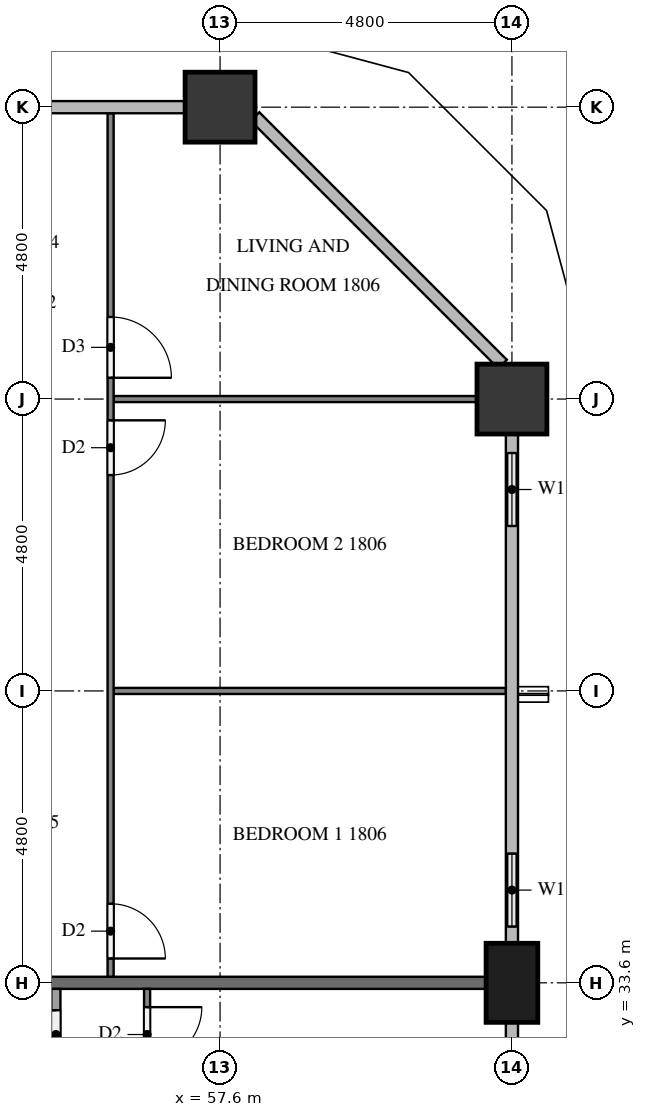
"""IFC4 building model, lengths in metres.
Left out: names, types, materials, properties, quantities, classifications, styles, units other than length and angle.
Written with IfcOpenShell. Run it as: python <this file> out.ifc"""

import sys

from ifc_helpers import new_model, si_unit, direction, frame, frame_2d, origin, origin_2d, place, context, subcontext, project, spatial, rectangle, extrude, element, fill, save


model = new_model("IFC4")
c1 = context("Model", 3, precision=1e-05, world=origin(), true_north=direction((0.0, 1.0)))
c2 = subcontext(c1, "Body", "Model", "MODEL_VIEW")
j1 = project(units=[si_unit("LENGTHUNIT", "METRE"), si_unit("PLANEANGLEUNIT", "RADIAN")], contexts=[c1])
p1 = place(None, origin())
s1 = spatial("IfcSite", under=j1, at=p1, CompositionType="ELEMENT")
p2 = place(p1, origin())
s2 = spatial("IfcBuilding", under=s1, at=p2, CompositionType="ELEMENT")
p3 = place(p2, frame((0.0, 0.0, 73.3)))
s3 = spatial("IfcBuildingStorey", under=s2, at=p3, CompositionType="ELEMENT", Elevation=73.3)
p4 = place(p3, frame((62.4, 33.6, 0.0), z_axis=(0.0, 0.0, 1.0), x_axis=(0.0, 1.0, 0.0)))
e1 = element("IfcColumn", 1, at=p4, inside=s3, PredefinedType="COLUMN", context=c2, shape_type="SweptSolid", body=[
    extrude(rectangle(XDim=1.3, YDim=0.85, at=origin_2d()), origin(), (0.0, 0.0, 1.0), 3.2),
])
for number, where, z_axis, x_axis in (
    (2, (62.4, 43.2, 0.0), (0.0, 0.0, 1.0), (1.0, 0.0, 0.0)),
    (3, (57.6, 48.0, 0.0), (0.0, 0.0, 1.0), (1.0, 0.0, 0.0)),
):
    element("IfcColumn", number, at=place(p3, frame(where, z_axis=z_axis, x_axis=x_axis)), inside=s3, PredefinedType="COLUMN", context=c2, shape_type="SweptSolid", body=[
        extrude(rectangle(XDim=1.15, YDim=1.15, at=origin_2d()), origin(), (0.0, 0.0, 1.0), 3.2),
    ])
p5 = place(p3, frame((62.4, 31.2, 0.0), z_axis=(0.0, 0.0, 1.0), x_axis=(0.0, 1.0, 0.0)))
e4 = element("IfcWall", 4, at=p5, inside=s3, PredefinedType="SOLIDWALL", context=c2, shape_type="SweptSolid", body=[
    extrude(rectangle(XDim=1.75, YDim=0.15, at=frame_2d((0.875, 0.0))), origin(), (0.0, 0.0, 1.0), 3.2),
])
p6 = place(p5, frame((0.275, 0.0, 0.9)))
e5 = element("IfcOpeningElement", 5, at=p6, cuts=e4, PredefinedType="OPENING", context=c2, shape_type="SweptSolid", body=[
    extrude(rectangle(XDim=1.2, YDim=1.4, at=frame_2d((0.6, 0.7))), frame((0.0, 0.085, 0.0), z_axis=(0.0, -1.0, 0.0), x_axis=(1.0, 0.0, 0.0)), (0.0, 0.0, 1.0), 0.17),
])
p7 = place(p3, frame((62.4, 34.25, 0.0), z_axis=(0.0, 0.0, 1.0), x_axis=(0.0, 1.0, 0.0)))
e6 = element("IfcWall", 6, at=p7, inside=s3, PredefinedType="SOLIDWALL", context=c2, shape_type="SweptSolid", body=[
    extrude(rectangle(XDim=1.75, YDim=0.15, at=frame_2d((0.875, 0.0))), origin(), (0.0, 0.0, 1.0), 3.2),
])
p8 = place(p7, frame((0.275, 0.0, 0.9)))
e7 = element("IfcOpeningElement", 7, at=p8, cuts=e6, PredefinedType="OPENING", context=c2, shape_type="SweptSolid", body=[
    extrude(rectangle(XDim=1.2, YDim=1.4, at=frame_2d((0.6, 0.7))), frame((0.0, 0.085, 0.0), z_axis=(0.0, -1.0, 0.0), x_axis=(1.0, 0.0, 0.0)), (0.0, 0.0, 1.0), 0.17),
])
p9 = place(p3, frame((62.4, 40.8, 0.0), z_axis=(0.0, 0.0, 1.0), x_axis=(0.0, 1.0, 0.0)))
e8 = element("IfcWall", 8, at=p9, inside=s3, PredefinedType="SOLIDWALL", context=c2, shape_type="SweptSolid", body=[
    extrude(rectangle(XDim=1.825, YDim=0.15, at=frame_2d((0.913, 0.0))), origin(), (0.0, 0.0, 1.0), 3.2),
])
p10 = place(p9, frame((0.312, 0.0, 0.9)))
e9 = element("IfcOpeningElement", 9, at=p10, cuts=e8, PredefinedType="OPENING", context=c2, shape_type="SweptSolid", body=[
    extrude(rectangle(XDim=1.2, YDim=1.4, at=frame_2d((0.6, 0.7))), frame((0.0, 0.085, 0.0), z_axis=(0.0, -1.0, 0.0), x_axis=(1.0, 0.0, 0.0)), (0.0, 0.0, 1.0), 0.17),
])
p11 = place(p3, frame((50.5, 33.6, 0.0), z_axis=(0.0, 0.0, 1.0), x_axis=(1.0, 0.0, 0.0)))
e10 = element("IfcWall", 10, at=p11, inside=s3, PredefinedType="PARTITIONING", context=c2, shape_type="SweptSolid", body=[
    extrude(rectangle(XDim=11.475, YDim=0.2, at=frame_2d((5.738, 0.0))), origin(), (0.0, 0.0, 1.0), 3.2),
])
p12 = place(p3, frame((56.4, 33.5, 0.0), z_axis=(0.0, 0.0, 1.0), x_axis=(0.0, -1.0, 0.0)))
e11 = element("IfcWall", 11, at=p12, inside=s3, PredefinedType="PARTITIONING", context=c2, shape_type="SweptSolid", body=[
    extrude(rectangle(XDim=14.2, YDim=0.1, at=frame_2d((7.1, 0.0))), origin(), (0.0, 0.0, 1.0), 3.2),
])
p13 = place(p12, frame((9.85, 0.0, 0.0)))
e12 = element("IfcOpeningElement", 12, at=p13, cuts=e11, PredefinedType="OPENING", context=c2, shape_type="SweptSolid", body=[
    extrude(rectangle(XDim=0.9, YDim=2.1, at=frame_2d((0.45, 1.05))), frame((0.0, 0.06, 0.0), z_axis=(0.0, -1.0, 0.0), x_axis=(1.0, 0.0, 0.0)), (0.0, 0.0, 1.0), 0.12),
])
p14 = place(p12, frame((8.15, 0.0, 0.0)))
e13 = element("IfcOpeningElement", 13, at=p14, cuts=e11, PredefinedType="OPENING", context=c2, shape_type="SweptSolid", body=[
    extrude(rectangle(XDim=1.0, YDim=2.1, at=frame_2d((0.5, 1.05))), frame((0.0, 0.06, 0.0), z_axis=(0.0, -1.0, 0.0), x_axis=(1.0, 0.0, 0.0)), (0.0, 0.0, 1.0), 0.12),
])
p15 = place(p12, frame((0.3, 0.0, 0.0)))
e14 = element("IfcOpeningElement", 14, at=p15, cuts=e11, PredefinedType="OPENING", context=c2, shape_type="SweptSolid", body=[
    extrude(rectangle(XDim=0.9, YDim=2.1, at=frame_2d((0.45, 1.05))), frame((0.0, 0.06, 0.0), z_axis=(0.0, -1.0, 0.0), x_axis=(1.0, 0.0, 0.0)), (0.0, 0.0, 1.0), 0.12),
])
p16 = place(p3, frame((54.9, 21.075, 0.0), z_axis=(0.0, 0.0, 1.0), x_axis=(0.0, 1.0, 0.0)))
e15 = element("IfcWall", 15, at=p16, inside=s3, PredefinedType="PARTITIONING", context=c2, shape_type="SweptSolid", body=[
    extrude(rectangle(XDim=12.425, YDim=0.15, at=frame_2d((6.212, 0.0))), origin(), (0.0, 0.0, 1.0), 3.2),
])
p17 = place(p16, frame((4.51, 0.0, 0.0)))
e16 = element("IfcOpeningElement", 16, at=p17, cuts=e15, PredefinedType="OPENING", context=c2, shape_type="SweptSolid", body=[
    extrude(rectangle(XDim=0.9, YDim=2.1, at=frame_2d((0.45, 1.05))), frame((0.0, 0.085, 0.0), z_axis=(0.0, -1.0, 0.0), x_axis=(1.0, 0.0, 0.0)), (0.0, 0.0, 1.0), 0.17),
])
p18 = place(p16, frame((6.06, 0.0, 0.0)))
e17 = element("IfcOpeningElement", 17, at=p18, cuts=e15, PredefinedType="OPENING", context=c2, shape_type="SweptSolid", body=[
    extrude(rectangle(XDim=0.9, YDim=2.1, at=frame_2d((0.45, 1.05))), frame((0.0, 0.085, 0.0), z_axis=(0.0, -1.0, 0.0), x_axis=(1.0, 0.0, 0.0)), (0.0, 0.0, 1.0), 0.17),
])
p19 = place(p16, frame((11.275, 0.0, 0.0)))
e18 = element("IfcOpeningElement", 18, at=p19, cuts=e15, PredefinedType="OPENING", context=c2, shape_type="SweptSolid", body=[
    extrude(rectangle(XDim=0.8, YDim=2.1, at=frame_2d((0.4, 1.05))), frame((0.0, 0.085, 0.0), z_axis=(0.0, -1.0, 0.0), x_axis=(1.0, 0.0, 0.0)), (0.0, 0.0, 1.0), 0.17),
])
p20 = place(p3, frame((55.85, 38.4, 0.0), z_axis=(0.0, 0.0, 1.0), x_axis=(1.0, 0.0, 0.0)))
e19 = element("IfcWall", 19, at=p20, inside=s3, PredefinedType="PARTITIONING", context=c2, shape_type="SweptSolid", body=[
    extrude(rectangle(XDim=6.45, YDim=0.1, at=frame_2d((3.225, 0.0))), origin(), (0.0, 0.0, 1.0), 3.2),
])
p21 = place(p3, frame((55.85, 43.2, 0.0), z_axis=(0.0, 0.0, 1.0), x_axis=(1.0, 0.0, 0.0)))
e20 = element("IfcWall", 20, at=p21, inside=s3, PredefinedType="PARTITIONING", context=c2, shape_type="SweptSolid", body=[
    extrude(rectangle(XDim=5.975, YDim=0.1, at=frame_2d((2.987, 0.0))), origin(), (0.0, 0.0, 1.0), 3.2),
])
p22 = place(p3, frame((55.8, 47.9, 0.0), z_axis=(0.0, 0.0, 1.0), x_axis=(0.0, -1.0, 0.0)))
e21 = element("IfcWall", 21, at=p22, inside=s3, PredefinedType="PARTITIONING", context=c2, shape_type="SweptSolid", body=[
    extrude(rectangle(XDim=14.2, YDim=0.1, at=frame_2d((7.1, 0.0))), origin(), (0.0, 0.0, 1.0), 3.2),
])
p23 = place(p22, frame((13.0, 0.0, 0.0)))
e22 = element("IfcOpeningElement", 22, at=p23, cuts=e21, PredefinedType="OPENING", context=c2, shape_type="SweptSolid", body=[
    extrude(rectangle(XDim=0.9, YDim=2.1, at=frame_2d((0.45, 1.05))), frame((0.0, 0.06, 0.0), z_axis=(0.0, -1.0, 0.0), x_axis=(1.0, 0.0, 0.0)), (0.0, 0.0, 1.0), 0.12),
])
p24 = place(p22, frame((5.05, 0.0, 0.0)))
e23 = element("IfcOpeningElement", 23, at=p24, cuts=e21, PredefinedType="OPENING", context=c2, shape_type="SweptSolid", body=[
    extrude(rectangle(XDim=0.9, YDim=2.1, at=frame_2d((0.45, 1.05))), frame((0.0, 0.06, 0.0), z_axis=(0.0, -1.0, 0.0), x_axis=(1.0, 0.0, 0.0)), (0.0, 0.0, 1.0), 0.12),
])
p25 = place(p22, frame((3.35, 0.0, 0.0)))
e24 = element("IfcOpeningElement", 24, at=p25, cuts=e21, PredefinedType="OPENING", context=c2, shape_type="SweptSolid", body=[
    extrude(rectangle(XDim=1.0, YDim=2.1, at=frame_2d((0.5, 1.05))), frame((0.0, 0.06, 0.0), z_axis=(0.0, -1.0, 0.0), x_axis=(1.0, 0.0, 0.0)), (0.0, 0.0, 1.0), 0.12),
])
p26 = place(p8, origin())
e25 = element("IfcWindow", 25, at=p26, inside=s3, PartitioningType="SINGLE_PANEL", PredefinedType="WINDOW", context=c2, shape_type="SweptSolid", body=[
    extrude(rectangle(XDim=1.2, YDim=1.4, at=frame_2d((0.6, 0.7))), frame((0.0, 0.03, 0.0), z_axis=(0.0, -1.0, 0.0), x_axis=(1.0, 0.0, 0.0)), (0.0, 0.0, 1.0), 0.06),
])
fill(e7, e25)
p27 = place(p10, origin())
e26 = element("IfcWindow", 26, at=p27, inside=s3, PartitioningType="SINGLE_PANEL", PredefinedType="WINDOW", context=c2, shape_type="SweptSolid", body=[
    extrude(rectangle(XDim=1.2, YDim=1.4, at=frame_2d((0.6, 0.7))), frame((0.0, 0.03, 0.0), z_axis=(0.0, -1.0, 0.0), x_axis=(1.0, 0.0, 0.0)), (0.0, 0.0, 1.0), 0.06),
])
fill(e9, e26)
p28 = place(p15, origin())
e27 = element("IfcDoor", 27, at=p28, inside=s3, OperationType="SINGLE_SWING_LEFT", PredefinedType="DOOR", context=c2, shape_type="SweptSolid", body=[
    extrude(rectangle(XDim=0.9, YDim=2.1, at=frame_2d((0.45, 1.05))), frame((0.0, 0.025, 0.0), z_axis=(0.0, -1.0, 0.0), x_axis=(1.0, 0.0, 0.0)), (0.0, 0.0, 1.0), 0.05),
])
fill(e14, e27)
p29 = place(p19, origin())
e28 = element("IfcDoor", 28, at=p29, inside=s3, OperationType="SINGLE_SWING_RIGHT", PredefinedType="DOOR", context=c2, shape_type="SweptSolid", body=[
    extrude(rectangle(XDim=0.8, YDim=2.1, at=frame_2d((0.4, 1.05))), frame((0.0, 0.025, 0.0), z_axis=(0.0, -1.0, 0.0), x_axis=(1.0, 0.0, 0.0)), (0.0, 0.0, 1.0), 0.05),
])
fill(e18, e28)
p30 = place(p23, origin())
e29 = element("IfcDoor", 29, at=p30, inside=s3, OperationType="SINGLE_SWING_RIGHT", PredefinedType="DOOR", context=c2, shape_type="SweptSolid", body=[
    extrude(rectangle(XDim=0.9, YDim=2.1, at=frame_2d((0.45, 1.05))), frame((0.0, 0.025, 0.0), z_axis=(0.0, -1.0, 0.0), x_axis=(1.0, 0.0, 0.0)), (0.0, 0.0, 1.0), 0.05),
])
fill(e22, e29)
p31 = place(p24, origin())
e30 = element("IfcDoor", 30, at=p31, inside=s3, OperationType="SINGLE_SWING_LEFT", PredefinedType="DOOR", context=c2, shape_type="SweptSolid", body=[
    extrude(rectangle(XDim=0.9, YDim=2.1, at=frame_2d((0.45, 1.05))), frame((0.0, 0.025, 0.0), z_axis=(0.0, -1.0, 0.0), x_axis=(1.0, 0.0, 0.0)), (0.0, 0.0, 1.0), 0.05),
])
fill(e23, e30)
p32 = place(p25, origin())
e31 = element("IfcDoor", 31, at=p32, inside=s3, OperationType="SINGLE_SWING_RIGHT", PredefinedType="DOOR", context=c2, shape_type="SweptSolid", body=[
    extrude(rectangle(XDim=1.0, YDim=2.1, at=frame_2d((0.5, 1.05))), frame((0.0, 0.025, 0.0), z_axis=(0.0, -1.0, 0.0), x_axis=(1.0, 0.0, 0.0)), (0.0, 0.0, 1.0), 0.05),
])
fill(e24, e31)
save(model, sys.argv[1])
